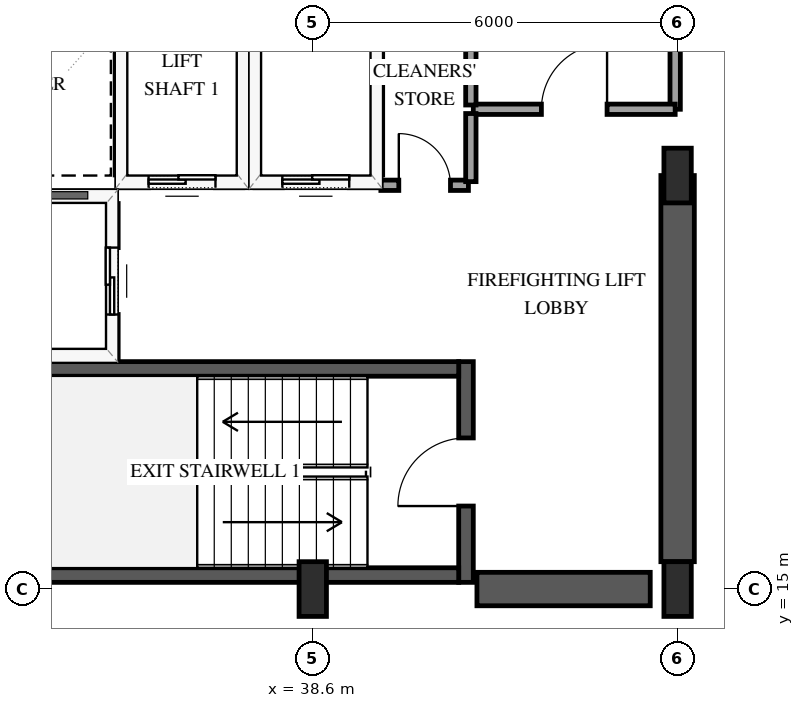
"""IFC4 building model, lengths in metres.
Left out: names, types, materials, properties, quantities, classifications, styles, units other than length and angle.
Written with IfcOpenShell. Run it as: python <this file> out.ifc"""

import sys

from ifc_helpers import new_model, si_unit, direction, frame, frame_2d, origin, origin_2d, place, context, subcontext, project, spatial, rectangle, extrude, element, fill, save


model = new_model("IFC4")
c1 = context("Model", 3, precision=1e-05, world=origin(), true_north=direction((0.0, 1.0)))
c2 = subcontext(c1, "Body", "Model", "MODEL_VIEW")
j1 = project(units=[si_unit("LENGTHUNIT", "METRE"), si_unit("PLANEANGLEUNIT", "RADIAN")], contexts=[c1])
p1 = place(None, origin())
s1 = spatial("IfcSite", under=j1, at=p1, CompositionType="ELEMENT")
p2 = place(p1, origin())
s2 = spatial("IfcBuilding", under=s1, at=p2, CompositionType="ELEMENT")
p3 = place(p2, frame((0.0, 0.0, 103.0)))
s3 = spatial("IfcBuildingStorey", under=s2, at=p3, CompositionType="ELEMENT", Elevation=103.0)
p4 = place(p3, frame((41.12, 15.11, 0.0), z_axis=(0.0, 0.0, 1.0), x_axis=(0.0, 1.0, 0.0)))
e1 = element("IfcWall", 1, at=p4, inside=s3, PredefinedType="SHEAR", context=c2, shape_type="SweptSolid", body=[
    extrude(rectangle(XDim=3.63, YDim=0.24, at=frame_2d((1.815, 0.0))), origin(), (0.0, 0.0, 1.0), 3.9),
])
p5 = place(p4, frame((1.255, 0.0, 0.0)))
e2 = element("IfcOpeningElement", 2, at=p5, cuts=e1, PredefinedType="OPENING", context=c2, shape_type="SweptSolid", body=[
    extrude(rectangle(XDim=1.12, YDim=2.15, at=frame_2d((0.56, 1.075))), frame((0.0, 0.13, 0.0), z_axis=(0.0, -1.0, 0.0), x_axis=(1.0, 0.0, 0.0)), (0.0, 0.0, 1.0), 0.26),
])
for number, where, z_axis, x_axis in (
    (3, (33.0, 15.23, 0.0), (0.0, 0.0, 1.0), (1.0, 0.0, 0.0)),
    (4, (33.0, 18.62, 0.0), (0.0, 0.0, 1.0), (1.0, 0.0, 0.0)),
):
    element("IfcWall", number, at=place(p3, frame(where, z_axis=z_axis, x_axis=x_axis)), inside=s3, PredefinedType="SHEAR", context=c2, shape_type="SweptSolid", body=[
        extrude(rectangle(XDim=8.0, YDim=0.24, at=frame_2d((4.0, 0.0))), origin(), (0.0, 0.0, 1.0), 3.9),
    ])
p6 = place(p3, frame((41.3, 15.0, 0.0), z_axis=(0.0, 0.0, 1.0), x_axis=(1.0, 0.0, 0.0)))
e5 = element("IfcWall", 5, at=p6, inside=s3, PredefinedType="SHEAR", context=c2, shape_type="SweptSolid", body=[
    extrude(rectangle(XDim=2.85, YDim=0.55, at=frame_2d((1.425, 0.0))), origin(), (0.0, 0.0, 1.0), 3.9),
])
p7 = place(p3, frame((44.6, 15.45, 0.0), z_axis=(0.0, 0.0, 1.0), x_axis=(0.0, 1.0, 0.0)))
e6 = element("IfcWall", 6, at=p7, inside=s3, PredefinedType="SHEAR", context=c2, shape_type="SweptSolid", body=[
    extrude(rectangle(XDim=6.35, YDim=0.55, at=frame_2d((3.175, 0.0))), origin(), (0.0, 0.0, 1.0), 3.9),
])
for number, where, z_axis, x_axis in (
    (7, (38.6, 15.0, 0.0), (0.0, 0.0, 1.0), (1.0, 0.0, 0.0)),
    (8, (44.6, 15.0, 0.0), (0.0, 0.0, 1.0), (1.0, 0.0, 0.0)),
    (9, (44.6, 21.8, 0.0), (0.0, 0.0, 1.0), (1.0, 0.0, 0.0)),
):
    element("IfcColumn", number, at=place(p3, frame(where, z_axis=z_axis, x_axis=x_axis)), inside=s3, PredefinedType="PILASTER", context=c2, shape_type="SweptSolid", body=[
        extrude(rectangle(XDim=0.45, YDim=0.9, at=origin_2d()), origin(), (0.0, 0.0, 1.0), 3.9),
    ])
p8 = place(p3, frame((35.45, 21.7, 0.0), z_axis=(0.0, 0.0, 1.0), x_axis=(1.0, 0.0, 0.0)))
e10 = element("IfcWall", 10, at=p8, inside=s3, PredefinedType="SOLIDWALL", context=c2, shape_type="SweptSolid", body=[
    extrude(rectangle(XDim=2.0, YDim=0.2, at=frame_2d((1.0, 0.0))), origin(), (0.0, 0.0, 1.0), 3.6),
])
p9 = place(p8, frame((0.45, 0.0, 0.0)))
e11 = element("IfcOpeningElement", 11, at=p9, cuts=e10, PredefinedType="OPENING", context=c2, shape_type="SweptSolid", body=[
    extrude(rectangle(XDim=1.1, YDim=2.15, at=frame_2d((0.55, 1.075))), frame((0.0, 0.11, 0.0), z_axis=(0.0, -1.0, 0.0), x_axis=(1.0, 0.0, 0.0)), (0.0, 0.0, 1.0), 0.22),
])
for number, where, z_axis, x_axis in (
    (12, (35.45, 21.81, 0.0), (0.0, 0.0, 1.0), (0.0, 1.0, 0.0)),
    (13, (37.45, 21.81, 0.0), (0.0, 0.0, 1.0), (0.0, 1.0, 0.0)),
):
    element("IfcWall", number, at=place(p3, frame(where, z_axis=z_axis, x_axis=x_axis)), inside=s3, PredefinedType="SOLIDWALL", context=c2, shape_type="SweptSolid", body=[
        extrude(rectangle(XDim=2.38, YDim=0.2, at=frame_2d((1.19, 0.0))), origin(), (0.0, 0.0, 1.0), 3.6),
    ])
p10 = place(p3, frame((37.65, 21.7, 0.0), z_axis=(0.0, 0.0, 1.0), x_axis=(1.0, 0.0, 0.0)))
e14 = element("IfcWall", 14, at=p10, inside=s3, PredefinedType="SOLIDWALL", context=c2, shape_type="SweptSolid", body=[
    extrude(rectangle(XDim=2.0, YDim=0.2, at=frame_2d((1.0, 0.0))), origin(), (0.0, 0.0, 1.0), 3.6),
])
p11 = place(p10, frame((0.45, 0.0, 0.0)))
e15 = element("IfcOpeningElement", 15, at=p11, cuts=e14, PredefinedType="OPENING", context=c2, shape_type="SweptSolid", body=[
    extrude(rectangle(XDim=1.1, YDim=2.15, at=frame_2d((0.55, 1.075))), frame((0.0, 0.11, 0.0), z_axis=(0.0, -1.0, 0.0), x_axis=(1.0, 0.0, 0.0)), (0.0, 0.0, 1.0), 0.22),
])
p12 = place(p3, frame((39.65, 21.81, 0.0), z_axis=(0.0, 0.0, 1.0), x_axis=(0.0, 1.0, 0.0)))
e16 = element("IfcWall", 16, at=p12, inside=s3, PredefinedType="SOLIDWALL", context=c2, shape_type="SweptSolid", body=[
    extrude(rectangle(XDim=2.38, YDim=0.2, at=frame_2d((1.19, 0.0))), origin(), (0.0, 0.0, 1.0), 3.6),
])
p13 = place(p3, frame((32.72, 21.45, 0.0), z_axis=(0.0, 0.0, 1.0), x_axis=(1.0, 0.0, 0.0)))
e17 = element("IfcWall", 17, at=p13, inside=s3, PredefinedType="SOLIDWALL", context=c2, shape_type="SweptSolid", body=[
    extrude(rectangle(XDim=2.58, YDim=0.2, at=frame_2d((1.29, 0.0))), origin(), (0.0, 0.0, 1.0), 3.6),
])
p14 = place(p3, frame((35.3, 18.79, 0.0), z_axis=(0.0, 0.0, 1.0), x_axis=(0.0, 1.0, 0.0)))
e18 = element("IfcWall", 18, at=p14, inside=s3, PredefinedType="SOLIDWALL", context=c2, shape_type="SweptSolid", body=[
    extrude(rectangle(XDim=2.55, YDim=0.2, at=frame_2d((1.275, 0.0))), origin(), (0.0, 0.0, 1.0), 3.6),
])
p15 = place(p14, frame((0.725, 0.0, 0.0)))
e19 = element("IfcOpeningElement", 19, at=p15, cuts=e18, PredefinedType="OPENING", context=c2, shape_type="SweptSolid", body=[
    extrude(rectangle(XDim=1.1, YDim=2.15, at=frame_2d((0.55, 1.075))), frame((0.0, 0.11, 0.0), z_axis=(0.0, -1.0, 0.0), x_axis=(1.0, 0.0, 0.0)), (0.0, 0.0, 1.0), 0.22),
])
p16 = place(p3, frame((44.56, 29.8, 0.0), z_axis=(0.0, 0.0, 1.0), x_axis=(0.0, -1.0, 0.0)))
e20 = element("IfcWall", 20, at=p16, inside=s3, PredefinedType="PARTITIONING", context=c2, shape_type="SweptSolid", body=[
    extrude(rectangle(XDim=6.91, YDim=0.17, at=frame_2d((3.455, 0.0))), origin(), (0.0, 0.0, 1.0), 2.64),
])
p17 = place(p16, frame((2.915, 0.0, 0.0)))
e21 = element("IfcOpeningElement", 21, at=p17, cuts=e20, PredefinedType="OPENING", context=c2, shape_type="SweptSolid", body=[
    extrude(rectangle(XDim=1.08, YDim=2.15, at=frame_2d((0.54, 1.075))), frame((0.0, 0.095, 0.0), z_axis=(0.0, -1.0, 0.0), x_axis=(1.0, 0.0, 0.0)), (0.0, 0.0, 1.0), 0.19),
])
p18 = place(p3, frame((41.24, 22.89, 0.0), z_axis=(0.0, 0.0, 1.0), x_axis=(1.0, 0.0, 0.0)))
e22 = element("IfcWall", 22, at=p18, inside=s3, PredefinedType="PARTITIONING", context=c2, shape_type="SweptSolid", body=[
    extrude(rectangle(XDim=3.32, YDim=0.17, at=frame_2d((1.66, 0.0))), origin(), (0.0, 0.0, 1.0), 3.6),
])
p19 = place(p18, frame((1.12, 0.0, 0.0)))
e23 = element("IfcOpeningElement", 23, at=p19, cuts=e22, PredefinedType="OPENING", context=c2, shape_type="SweptSolid", body=[
    extrude(rectangle(XDim=1.08, YDim=2.15, at=frame_2d((0.54, 1.075))), frame((0.0, 0.095, 0.0), z_axis=(0.0, -1.0, 0.0), x_axis=(1.0, 0.0, 0.0)), (0.0, 0.0, 1.0), 0.19),
])
p20 = place(p3, frame((41.2, 22.96, 0.0), z_axis=(0.0, 0.0, 1.0), x_axis=(0.0, 1.0, 0.0)))
e24 = element("IfcWall", 24, at=p20, inside=s3, PredefinedType="PARTITIONING", context=c2, shape_type="SweptSolid", body=[
    extrude(rectangle(XDim=1.69, YDim=0.17, at=frame_2d((0.845, 0.0))), origin(), (0.0, 0.0, 1.0), 3.6),
])
p21 = place(p3, frame((39.72, 21.64, 0.0), z_axis=(0.0, 0.0, 1.0), x_axis=(1.0, 0.0, 0.0)))
e25 = element("IfcWall", 25, at=p21, inside=s3, PredefinedType="PARTITIONING", context=c2, shape_type="SweptSolid", body=[
    extrude(rectangle(XDim=1.44, YDim=0.17, at=frame_2d((0.72, 0.0))), origin(), (0.0, 0.0, 1.0), 3.6),
])
p22 = place(p21, frame((0.295, 0.0, 0.0)))
e26 = element("IfcOpeningElement", 26, at=p22, cuts=e25, PredefinedType="OPENING", context=c2, shape_type="SweptSolid", body=[
    extrude(rectangle(XDim=0.85, YDim=2.1, at=frame_2d((0.425, 1.05))), frame((0.0, 0.095, 0.0), z_axis=(0.0, -1.0, 0.0), x_axis=(1.0, 0.0, 0.0)), (0.0, 0.0, 1.0), 0.19),
])
p23 = place(p3, frame((41.2, 21.7, 0.0), z_axis=(0.0, 0.0, 1.0), x_axis=(0.0, 1.0, 0.0)))
e27 = element("IfcWall", 27, at=p23, inside=s3, PredefinedType="PARTITIONING", context=c2, shape_type="SweptSolid", body=[
    extrude(rectangle(XDim=1.12, YDim=0.17, at=frame_2d((0.56, 0.0))), origin(), (0.0, 0.0, 1.0), 3.6),
])
p24 = place(p9, origin())
e28 = element("IfcDoor", 28, at=p24, inside=s3, OperationType="SLIDING_TO_LEFT", PredefinedType="DOOR", context=c2, shape_type="SweptSolid", body=[
    extrude(rectangle(XDim=1.1, YDim=2.15, at=frame_2d((0.55, 1.075))), frame((0.0, 0.025, 0.0), z_axis=(0.0, -1.0, 0.0), x_axis=(1.0, 0.0, 0.0)), (0.0, 0.0, 1.0), 0.05),
])
fill(e11, e28)
p25 = place(p11, origin())
e29 = element("IfcDoor", 29, at=p25, inside=s3, OperationType="SLIDING_TO_LEFT", PredefinedType="DOOR", context=c2, shape_type="SweptSolid", body=[
    extrude(rectangle(XDim=1.1, YDim=2.15, at=frame_2d((0.55, 1.075))), frame((0.0, 0.025, 0.0), z_axis=(0.0, -1.0, 0.0), x_axis=(1.0, 0.0, 0.0)), (0.0, 0.0, 1.0), 0.05),
])
fill(e15, e29)
p26 = place(p15, origin())
e30 = element("IfcDoor", 30, at=p26, inside=s3, OperationType="SLIDING_TO_LEFT", PredefinedType="DOOR", context=c2, shape_type="SweptSolid", body=[
    extrude(rectangle(XDim=1.1, YDim=2.15, at=frame_2d((0.55, 1.075))), frame((0.0, 0.025, 0.0), z_axis=(0.0, -1.0, 0.0), x_axis=(1.0, 0.0, 0.0)), (0.0, 0.0, 1.0), 0.05),
])
fill(e19, e30)
p27 = place(p5, origin())
e31 = element("IfcDoor", 31, at=p27, inside=s3, OperationType="SINGLE_SWING_LEFT", PredefinedType="DOOR", context=c2, shape_type="SweptSolid", body=[
    extrude(rectangle(XDim=1.12, YDim=2.15, at=frame_2d((0.56, 1.075))), frame((0.0, 0.025, 0.0), z_axis=(0.0, -1.0, 0.0), x_axis=(1.0, 0.0, 0.0)), (0.0, 0.0, 1.0), 0.05),
])
fill(e2, e31)
p28 = place(p19, origin())
e32 = element("IfcDoor", 32, at=p28, inside=s3, OperationType="SINGLE_SWING_RIGHT", PredefinedType="DOOR", context=c2, shape_type="SweptSolid", body=[
    extrude(rectangle(XDim=1.08, YDim=2.15, at=frame_2d((0.54, 1.075))), frame((0.0, 0.025, 0.0), z_axis=(0.0, -1.0, 0.0), x_axis=(1.0, 0.0, 0.0)), (0.0, 0.0, 1.0), 0.05),
])
fill(e23, e32)
p29 = place(p22, origin())
e33 = element("IfcDoor", 33, at=p29, inside=s3, OperationType="SINGLE_SWING_LEFT", PredefinedType="DOOR", context=c2, shape_type="SweptSolid", body=[
    extrude(rectangle(XDim=0.85, YDim=2.1, at=frame_2d((0.425, 1.05))), frame((0.0, 0.025, 0.0), z_axis=(0.0, -1.0, 0.0), x_axis=(1.0, 0.0, 0.0)), (0.0, 0.0, 1.0), 0.05),
])
fill(e26, e33)
save(model, sys.argv[1])
